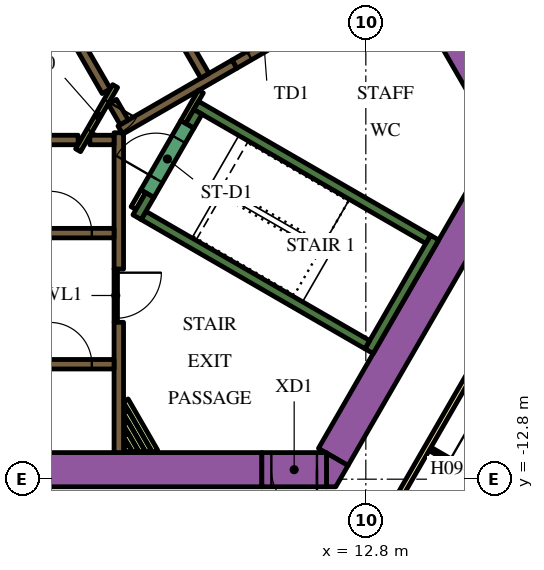
"""IFC4 building model, lengths in metres.
Left out: names, types, materials, properties, quantities, classifications, styles, units other than length and angle.
Written with IfcOpenShell. Run it as: python <this file> out.ifc"""

import sys

from ifc_helpers import new_model, si_unit, direction, frame, frame_2d, origin, place, context, subcontext, project, spatial, polyline, rectangle, outline, extrude, element, fill, save


model = new_model("IFC4")
c1 = context("Model", 3, precision=1e-05, world=origin(), true_north=direction((0.0, 1.0)))
c2 = subcontext(c1, "Body", "Model", "MODEL_VIEW")
j1 = project(units=[si_unit("LENGTHUNIT", "METRE"), si_unit("PLANEANGLEUNIT", "RADIAN")], contexts=[c1])
p1 = place(None, origin())
s1 = spatial("IfcSite", under=j1, at=p1, CompositionType="ELEMENT")
p2 = place(p1, origin())
s2 = spatial("IfcBuilding", under=s1, at=p2, CompositionType="ELEMENT")
p3 = place(p2, frame((0.0, 0.0, 118.8)))
s3 = spatial("IfcBuildingStorey", under=s2, at=p3, CompositionType="ELEMENT", Elevation=118.8)
p4 = place(p3, frame((6.776, 13.364, 0.0), z_axis=(0.0, 0.0, 1.0), x_axis=(0.500004177138, -0.8660229921, 0.0)))
e1 = element("IfcWall", 1, at=p4, inside=s3, PredefinedType="SOLIDWALL", context=c2, shape_type="SweptSolid", body=[
    extrude(rectangle(XDim=20.204, YDim=0.9, at=frame_2d((10.102, 0.0))), origin(), (0.0, 0.0, 1.0), 3.9),
])
p5 = place(p3, frame((11.943, -12.214, 0.0), z_axis=(0.0, 0.0, 1.0), x_axis=(0.49998092645, 0.866036415623, 0.0)))
e2 = element("IfcWall", 2, at=p5, inside=s3, PredefinedType="SOLIDWALL", context=c2, shape_type="SweptSolid", body=[
    extrude(rectangle(XDim=8.83, YDim=0.9, at=frame_2d((4.415, 0.0))), origin(), (0.0, 0.0, 1.0), 3.9),
])
p6 = place(p3, origin())
e3 = element("IfcWall", 3, at=p6, inside=s3, PredefinedType="SOLIDWALL", context=c2, shape_type="SweptSolid", body=[
    extrude(outline(polyline([(12.009, -13.0), (11.764, -13.0), (11.764, -12.113), (12.332, -12.441), (12.009, -13.0)])), origin(), (0.0, 0.0, 1.0), 3.9),
])
p7 = place(p3, frame((-12.019, -12.55, 0.0), z_axis=(0.0, 0.0, 1.0), x_axis=(1.0, 0.0, 0.0)))
e4 = element("IfcWall", 4, at=p7, inside=s3, PredefinedType="SOLIDWALL", context=c2, shape_type="SweptSolid", body=[
    extrude(rectangle(XDim=22.083, YDim=0.9, at=frame_2d((11.042, 0.0))), origin(), (0.0, 0.0, 1.0), 3.9),
])
p8 = place(p3, frame((12.885, -9.431, 0.0), z_axis=(0.0, 0.0, 1.0), x_axis=(0.500020560727, 0.866013532718, 0.0)))
e5 = element("IfcWall", 5, at=p8, inside=s3, PredefinedType="SOLIDWALL", context=c2, shape_type="SweptSolid", body=[
    extrude(rectangle(XDim=3.45, YDim=0.25, at=frame_2d((1.725, 0.0))), origin(), (0.0, 0.0, 1.0), 3.9),
])
p9 = place(p3, frame((12.84, -9.261, 0.0), z_axis=(0.0, 0.0, 1.0), x_axis=(-0.866013990052, 0.500019768644, 0.0)))
e6 = element("IfcWall", 6, at=p9, inside=s3, PredefinedType="SOLIDWALL", context=c2, shape_type="SweptSolid", body=[
    extrude(rectangle(XDim=6.8, YDim=0.25, at=frame_2d((3.4, 0.0))), origin(), (0.0, 0.0, 1.0), 3.9),
])
p10 = place(p3, frame((6.78, -5.906, 0.0), z_axis=(0.0, 0.0, 1.0), x_axis=(0.500223362819, 0.865896406789, 0.0)))
e7 = element("IfcWall", 7, at=p10, inside=s3, PredefinedType="SOLIDWALL", context=c2, shape_type="SweptSolid", body=[
    extrude(rectangle(XDim=0.675, YDim=0.25, at=frame_2d((0.337, 0.0))), origin(), (0.0, 0.0, 1.0), 3.9),
])
p11 = place(p3, frame((8.334, -2.964, 0.0), z_axis=(0.0, 0.0, 1.0), x_axis=(0.866016039709, -0.500016218704, 0.0)))
e8 = element("IfcWall", 8, at=p11, inside=s3, PredefinedType="SOLIDWALL", context=c2, shape_type="SweptSolid", body=[
    extrude(rectangle(XDim=7.05, YDim=0.25, at=frame_2d((3.525, 0.0))), origin(), (0.0, 0.0, 1.0), 3.9),
])
p12 = place(p3, frame((8.168, -3.503, 0.0), z_axis=(0.0, 0.0, 1.0), x_axis=(0.49972245349, 0.866185586049, 0.0)))
e9 = element("IfcWall", 9, at=p12, inside=s3, PredefinedType="SOLIDWALL", context=c2, shape_type="SweptSolid", body=[
    extrude(rectangle(XDim=0.425, YDim=0.25, at=frame_2d((0.212, 0.0))), origin(), (0.0, 0.0, 1.0), 3.9),
])
p13 = place(p3, frame((-5.259, -3.875, 0.0), z_axis=(0.0, 0.0, 1.0), x_axis=(1.0, 0.0, 0.0)))
e10 = element("IfcWall", 10, at=p13, inside=s3, PredefinedType="SOLIDWALL", context=c2, shape_type="SweptSolid", body=[
    extrude(rectangle(XDim=10.489, YDim=0.25, at=frame_2d((5.244, 0.0))), origin(), (0.0, 0.0, 1.0), 3.9),
])
p14 = place(p3, frame((6.3, -7.27, 0.0), z_axis=(0.0, 0.0, 1.0), x_axis=(0.0, 1.0, 0.0)))
e11 = element("IfcWall", 11, at=p14, inside=s3, PredefinedType="SOLIDWALL", context=c2, shape_type="SweptSolid", body=[
    extrude(rectangle(XDim=3.586, YDim=0.25, at=frame_2d((1.793, 0.0))), origin(), (0.0, 0.0, 1.0), 3.9),
])
p15 = place(p3, frame((6.3, -12.1, 0.0), z_axis=(0.0, 0.0, 1.0), x_axis=(0.0, 1.0, 0.0)))
e12 = element("IfcWall", 12, at=p15, inside=s3, PredefinedType="SOLIDWALL", context=c2, shape_type="SweptSolid", body=[
    extrude(rectangle(XDim=3.428, YDim=0.25, at=frame_2d((1.714, 0.0))), origin(), (0.0, 0.0, 1.0), 3.9),
])
p16 = place(p3, frame((5.538, -3.875, 0.0), z_axis=(0.0, 0.0, 1.0), x_axis=(1.0, 0.0, 0.0)))
e13 = element("IfcWall", 13, at=p16, inside=s3, PredefinedType="SOLIDWALL", context=c2, shape_type="SweptSolid", body=[
    extrude(rectangle(XDim=0.637, YDim=0.25, at=frame_2d((0.318, 0.0))), origin(), (0.0, 0.0, 1.0), 3.9),
])
p17 = place(p3, frame((9.346, -1.879, 0.0), z_axis=(0.0, 0.0, 1.0), x_axis=(-0.866048528039, -0.499959945477, 0.0)))
e14 = element("IfcWall", 14, at=p17, inside=s3, PredefinedType="SOLIDWALL", context=c2, shape_type="SweptSolid", body=[
    extrude(rectangle(XDim=3.47, YDim=0.25, at=frame_2d((1.735, 0.0))), origin(), (0.0, 0.0, 1.0), 3.9),
])
p18 = place(p3, frame((6.13, -2.867, 0.0), z_axis=(0.0, 0.0, 1.0), x_axis=(0.500160776593, -0.865932559475, 0.0)))
e15 = element("IfcWall", 15, at=p18, inside=s3, PredefinedType="SOLIDWALL", context=c2, shape_type="SweptSolid", body=[
    extrude(rectangle(XDim=0.627, YDim=0.25, at=frame_2d((0.313, 0.0))), origin(), (0.0, 0.0, 1.0), 3.9),
])
p19 = place(p3, frame((5.97, -2.591, 0.0), z_axis=(0.0, 0.0, 1.0), x_axis=(-0.499994469932, 0.866028596547, 0.0)))
e16 = element("IfcWall", 16, at=p19, inside=s3, PredefinedType="SOLIDWALL", context=c2, shape_type="SweptSolid", body=[
    extrude(rectangle(XDim=10.488, YDim=0.25, at=frame_2d((5.244, 0.0))), origin(), (0.0, 0.0, 1.0), 3.9),
])
p20 = place(p3, frame((6.48, -10.726, 0.0), z_axis=(0.0, 0.0, 1.0), x_axis=(0.500017819788, -0.86601511528, 0.0)))
e17 = element("IfcWall", 17, at=p20, inside=s3, PredefinedType="PARTITIONING", context=c2, shape_type="SweptSolid", body=[
    extrude(rectangle(XDim=1.55, YDim=0.15, at=frame_2d((0.775, 0.0))), origin(), (0.0, 0.0, 1.0), 2.75),
])
p21 = place(p3, frame((6.48, -11.026, 0.0), z_axis=(0.0, 0.0, 1.0), x_axis=(0.49995654735, -0.86605048973, 0.0)))
e18 = element("IfcWall", 18, at=p21, inside=s3, PredefinedType="PARTITIONING", context=c2, shape_type="SweptSolid", body=[
    extrude(rectangle(XDim=1.204, YDim=0.15, at=frame_2d((0.602, 0.0))), origin(), (0.0, 0.0, 1.0), 2.75),
])
p22 = place(p3, frame((6.48, -11.326, 0.0), z_axis=(0.0, 0.0, 1.0), x_axis=(0.500059337743, -0.865991142412, 0.0)))
e19 = element("IfcWall", 19, at=p22, inside=s3, PredefinedType="PARTITIONING", context=c2, shape_type="SweptSolid", body=[
    extrude(rectangle(XDim=0.857, YDim=0.15, at=frame_2d((0.429, 0.0))), origin(), (0.0, 0.0, 1.0), 2.75),
])
p23 = place(p3, frame((6.48, -11.626, 0.0), z_axis=(0.0, 0.0, 1.0), x_axis=(0.500301480982, -0.865851273677, 0.0)))
e20 = element("IfcWall", 20, at=p23, inside=s3, PredefinedType="PARTITIONING", context=c2, shape_type="SweptSolid", body=[
    extrude(rectangle(XDim=0.511, YDim=0.15, at=frame_2d((0.255, 0.0))), origin(), (0.0, 0.0, 1.0), 2.75),
])
p24 = place(p3, frame((6.48, -11.926, 0.0), z_axis=(0.0, 0.0, 1.0), x_axis=(0.500450775723, -0.86576499183, 0.0)))
e21 = element("IfcWall", 21, at=p24, inside=s3, PredefinedType="PARTITIONING", context=c2, shape_type="SweptSolid", body=[
    extrude(rectangle(XDim=0.164, YDim=0.15, at=frame_2d((0.082, 0.0))), origin(), (0.0, 0.0, 1.0), 2.75),
])
p25 = place(p3, frame((6.945, -5.222, 0.0), z_axis=(0.0, 0.0, 1.0), x_axis=(-0.499818422106, -0.866130212453, 0.0)))
e22 = element("IfcWall", 22, at=p25, inside=s3, PredefinedType="PARTITIONING", context=c2, shape_type="SweptSolid", body=[
    extrude(rectangle(XDim=0.514, YDim=0.15, at=frame_2d((0.257, 0.0))), origin(), (0.0, 0.0, 1.0), 2.75),
])
p26 = place(p3, frame((8.459, -2.599, 0.0), z_axis=(0.0, 0.0, 1.0), x_axis=(-0.500041054325, -0.866001699761, 0.0)))
e23 = element("IfcWall", 23, at=p26, inside=s3, PredefinedType="PARTITIONING", context=c2, shape_type="SweptSolid", body=[
    extrude(rectangle(XDim=0.929, YDim=0.15, at=frame_2d((0.464, 0.0))), origin(), (0.0, 0.0, 1.0), 3.9),
])
p27 = place(p3, frame((-6.175, -9.775, 0.0), z_axis=(0.0, 0.0, 1.0), x_axis=(1.0, 0.0, 0.0)))
e24 = element("IfcWall", 24, at=p27, inside=s3, PredefinedType="SOLIDWALL", context=c2, shape_type="SweptSolid", body=[
    extrude(rectangle(XDim=12.35, YDim=0.25, at=frame_2d((6.175, 0.0))), origin(), (0.0, 0.0, 1.0), 3.9),
])
p28 = place(p27, frame((0.585, 0.0, 0.0)))
e25 = element("IfcOpeningElement", 25, at=p28, cuts=e24, PredefinedType="OPENING", context=c2, shape_type="SweptSolid", body=[
    extrude(rectangle(XDim=1.1, YDim=2.1, at=frame_2d((0.55, 1.05))), frame((0.0, 0.135, 0.0), z_axis=(0.0, -1.0, 0.0), x_axis=(1.0, 0.0, 0.0)), (0.0, 0.0, 1.0), 0.27),
])
p29 = place(p27, frame((3.105, 0.0, 0.0)))
e26 = element("IfcOpeningElement", 26, at=p29, cuts=e24, PredefinedType="OPENING", context=c2, shape_type="SweptSolid", body=[
    extrude(rectangle(XDim=1.1, YDim=2.1, at=frame_2d((0.55, 1.05))), frame((0.0, 0.135, 0.0), z_axis=(0.0, -1.0, 0.0), x_axis=(1.0, 0.0, 0.0)), (0.0, 0.0, 1.0), 0.27),
])
p30 = place(p27, frame((5.625, 0.0, 0.0)))
e27 = element("IfcOpeningElement", 27, at=p30, cuts=e24, PredefinedType="OPENING", context=c2, shape_type="SweptSolid", body=[
    extrude(rectangle(XDim=1.1, YDim=2.1, at=frame_2d((0.55, 1.05))), frame((0.0, 0.135, 0.0), z_axis=(0.0, -1.0, 0.0), x_axis=(1.0, 0.0, 0.0)), (0.0, 0.0, 1.0), 0.27),
])
p31 = place(p27, frame((8.145, 0.0, 0.0)))
e28 = element("IfcOpeningElement", 28, at=p31, cuts=e24, PredefinedType="OPENING", context=c2, shape_type="SweptSolid", body=[
    extrude(rectangle(XDim=1.1, YDim=2.1, at=frame_2d((0.55, 1.05))), frame((0.0, 0.135, 0.0), z_axis=(0.0, -1.0, 0.0), x_axis=(1.0, 0.0, 0.0)), (0.0, 0.0, 1.0), 0.27),
])
p32 = place(p27, frame((10.665, 0.0, 0.0)))
e29 = element("IfcOpeningElement", 29, at=p32, cuts=e24, PredefinedType="OPENING", context=c2, shape_type="SweptSolid", body=[
    extrude(rectangle(XDim=1.1, YDim=2.1, at=frame_2d((0.55, 1.05))), frame((0.0, 0.135, 0.0), z_axis=(0.0, -1.0, 0.0), x_axis=(1.0, 0.0, 0.0)), (0.0, 0.0, 1.0), 0.27),
])
p33 = place(p3, frame((-6.175, -6.325, 0.0), z_axis=(0.0, 0.0, 1.0), x_axis=(1.0, 0.0, 0.0)))
e30 = element("IfcWall", 30, at=p33, inside=s3, PredefinedType="SOLIDWALL", context=c2, shape_type="SweptSolid", body=[
    extrude(rectangle(XDim=12.35, YDim=0.25, at=frame_2d((6.175, 0.0))), origin(), (0.0, 0.0, 1.0), 3.9),
])
p34 = place(p33, frame((3.205, 0.0, 0.0)))
e31 = element("IfcOpeningElement", 31, at=p34, cuts=e30, PredefinedType="OPENING", context=c2, shape_type="SweptSolid", body=[
    extrude(rectangle(XDim=0.9, YDim=2.1, at=frame_2d((0.45, 1.05))), frame((0.0, 0.135, 0.0), z_axis=(0.0, -1.0, 0.0), x_axis=(1.0, 0.0, 0.0)), (0.0, 0.0, 1.0), 0.27),
])
p35 = place(p33, frame((8.145, 0.0, 0.0)))
e32 = element("IfcOpeningElement", 32, at=p35, cuts=e30, PredefinedType="OPENING", context=c2, shape_type="SweptSolid", body=[
    extrude(rectangle(XDim=1.1, YDim=2.1, at=frame_2d((0.55, 1.05))), frame((0.0, 0.135, 0.0), z_axis=(0.0, -1.0, 0.0), x_axis=(1.0, 0.0, 0.0)), (0.0, 0.0, 1.0), 0.27),
])
p36 = place(p33, frame((10.665, 0.0, 0.0)))
e33 = element("IfcOpeningElement", 33, at=p36, cuts=e30, PredefinedType="OPENING", context=c2, shape_type="SweptSolid", body=[
    extrude(rectangle(XDim=1.1, YDim=2.1, at=frame_2d((0.55, 1.05))), frame((0.0, 0.135, 0.0), z_axis=(0.0, -1.0, 0.0), x_axis=(1.0, 0.0, 0.0)), (0.0, 0.0, 1.0), 0.27),
])
p37 = place(p3, frame((8.565, -2.185, 0.0), z_axis=(0.0, 0.0, 1.0), x_axis=(-0.499997954832, 0.866026584559, 0.0)))
e34 = element("IfcWall", 34, at=p37, inside=s3, PredefinedType="SOLIDWALL", context=c2, shape_type="SweptSolid", body=[
    extrude(rectangle(XDim=12.35, YDim=0.25, at=frame_2d((6.175, 0.0))), origin(), (0.0, 0.0, 1.0), 3.9),
])
p38 = place(p37, frame((5.725, 0.0, 0.0)))
e35 = element("IfcOpeningElement", 35, at=p38, cuts=e34, PredefinedType="OPENING", context=c2, shape_type="SweptSolid", body=[
    extrude(rectangle(XDim=0.9, YDim=2.1, at=frame_2d((0.45, 1.05))), frame((0.0, 0.135, 0.0), z_axis=(0.0, -1.0, 0.0), x_axis=(1.0, 0.0, 0.0)), (0.0, 0.0, 1.0), 0.27),
])
p39 = place(p3, frame((7.053, -5.284, 0.0), z_axis=(0.0, 0.0, 1.0), x_axis=(0.500078061341, 0.865980330357, 0.0)))
e36 = element("IfcWall", 36, at=p39, inside=s3, PredefinedType="SOLIDWALL", context=c2, shape_type="SweptSolid", body=[
    extrude(rectangle(XDim=2.1, YDim=0.4, at=frame_2d((1.05, 0.0))), origin(), (0.0, 0.0, 1.0), 3.9),
])
p40 = place(p39, frame((0.45, 0.0, 0.0)))
e37 = element("IfcOpeningElement", 37, at=p40, cuts=e36, PredefinedType="OPENING", context=c2, shape_type="SweptSolid", body=[
    extrude(rectangle(XDim=1.2, YDim=2.1, at=frame_2d((0.6, 1.05))), frame((0.0, 0.21, 0.0), z_axis=(0.0, -1.0, 0.0), x_axis=(1.0, 0.0, 0.0)), (0.0, 0.0, 1.0), 0.42),
])
p41 = place(p3, frame((9.346, -1.879, 0.0), z_axis=(0.0, 0.0, 1.0), x_axis=(0.866047807691, 0.499961193289, 0.0)))
e38 = element("IfcWall", 38, at=p41, inside=s3, PredefinedType="SOLIDWALL", context=c2, shape_type="SweptSolid", body=[
    extrude(rectangle(XDim=1.8, YDim=0.25, at=frame_2d((0.9, 0.0))), origin(), (0.0, 0.0, 1.0), 3.9),
])
p42 = place(p41, frame((0.45, 0.0, 0.0)))
e39 = element("IfcOpeningElement", 39, at=p42, cuts=e38, PredefinedType="OPENING", context=c2, shape_type="SweptSolid", body=[
    extrude(rectangle(XDim=0.9, YDim=2.1, at=frame_2d((0.45, 1.05))), frame((0.0, 0.135, 0.0), z_axis=(0.0, -1.0, 0.0), x_axis=(1.0, 0.0, 0.0)), (0.0, 0.0, 1.0), 0.27),
])
p43 = place(p3, frame((6.203, -2.456, 0.0), z_axis=(0.0, 0.0, 1.0), x_axis=(-0.500043961785, -0.866000020948, 0.0)))
e40 = element("IfcWall", 40, at=p43, inside=s3, PredefinedType="PARTITIONING", context=c2, shape_type="SweptSolid", body=[
    extrude(rectangle(XDim=1.95, YDim=0.15, at=frame_2d((0.975, 0.0))), origin(), (0.0, 0.0, 1.0), 3.9),
])
p44 = place(p43, frame((0.45, 0.0, 0.0)))
e41 = element("IfcOpeningElement", 41, at=p44, cuts=e40, PredefinedType="OPENING", context=c2, shape_type="SweptSolid", body=[
    extrude(rectangle(XDim=0.9, YDim=2.1, at=frame_2d((0.45, 1.05))), frame((0.0, 0.085, 0.0), z_axis=(0.0, -1.0, 0.0), x_axis=(1.0, 0.0, 0.0)), (0.0, 0.0, 1.0), 0.17),
])
p45 = place(p3, frame((6.22, -7.266, 0.0), z_axis=(0.0, 0.0, 1.0), x_axis=(0.0, -1.0, 0.0)))
e42 = element("IfcWall", 42, at=p45, inside=s3, PredefinedType="PARTITIONING", context=c2, shape_type="SweptSolid", body=[
    extrude(rectangle(XDim=1.4, YDim=0.09, at=frame_2d((0.7, 0.0))), origin(), (0.0, 0.0, 1.0), 2.75),
])
p46 = place(p45, frame((0.1, 0.0, 0.0)))
e43 = element("IfcOpeningElement", 43, at=p46, cuts=e42, PredefinedType="OPENING", context=c2, shape_type="SweptSolid", body=[
    extrude(rectangle(XDim=1.2, YDim=2.1, at=frame_2d((0.6, 1.05))), frame((0.0, 0.055, 0.0), z_axis=(0.0, -1.0, 0.0), x_axis=(1.0, 0.0, 0.0)), (0.0, 0.0, 1.0), 0.11),
])
p47 = place(p3, frame((11.764, -12.55, 0.0), z_axis=(0.0, 0.0, 1.0), x_axis=(-1.0, 0.0, 0.0)))
e44 = element("IfcWall", 44, at=p47, inside=s3, PredefinedType="SOLIDWALL", context=c2, shape_type="SweptSolid", body=[
    extrude(rectangle(XDim=1.7, YDim=0.9, at=frame_2d((0.85, 0.0))), origin(), (0.0, 0.0, 1.0), 3.9),
])
p48 = place(p47, frame((0.25, 0.0, 0.0)))
e45 = element("IfcOpeningElement", 45, at=p48, cuts=e44, PredefinedType="OPENING", context=c2, shape_type="SweptSolid", body=[
    extrude(rectangle(XDim=1.2, YDim=2.1, at=frame_2d((0.6, 1.05))), frame((0.0, 0.46, 0.0), z_axis=(0.0, -1.0, 0.0), x_axis=(1.0, 0.0, 0.0)), (0.0, 0.0, 1.0), 0.92),
])
p49 = place(p3, frame((6.163, 18.475, 0.0), z_axis=(0.0, 0.0, 1.0), x_axis=(0.500001317485, -0.866024643133, 0.0)))
e46 = element("IfcWall", 46, at=p49, inside=s3, PredefinedType="PARTITIONING", context=c2, shape_type="SweptSolid", body=[
    extrude(rectangle(XDim=25.767, YDim=0.15, at=frame_2d((12.883, 0.0))), origin(), (0.0, 0.0, 1.0), 2.75),
])
p50 = place(p49, frame((19.306, 0.0, 0.0)))
e47 = element("IfcOpeningElement", 47, at=p50, cuts=e46, PredefinedType="OPENING", context=c2, shape_type="SweptSolid", body=[
    extrude(rectangle(XDim=1.0, YDim=2.1, at=frame_2d((0.5, 1.05))), frame((0.0, 0.085, 0.0), z_axis=(0.0, -1.0, 0.0), x_axis=(1.0, 0.0, 0.0)), (0.0, 0.0, 1.0), 0.17),
])
p51 = place(p49, frame((17.999, 0.0, 0.0)))
e48 = element("IfcOpeningElement", 48, at=p51, cuts=e46, PredefinedType="OPENING", context=c2, shape_type="SweptSolid", body=[
    extrude(rectangle(XDim=1.0, YDim=2.1, at=frame_2d((0.5, 1.05))), frame((0.0, 0.085, 0.0), z_axis=(0.0, -1.0, 0.0), x_axis=(1.0, 0.0, 0.0)), (0.0, 0.0, 1.0), 0.17),
])
p52 = place(p49, frame((0.596, 0.0, 0.0)))
e49 = element("IfcOpeningElement", 49, at=p52, cuts=e46, PredefinedType="OPENING", context=c2, shape_type="SweptSolid", body=[
    extrude(rectangle(XDim=1.0, YDim=2.1, at=frame_2d((0.5, 1.05))), frame((0.0, 0.085, 0.0), z_axis=(0.0, -1.0, 0.0), x_axis=(1.0, 0.0, 0.0)), (0.0, 0.0, 1.0), 0.17),
])
p53 = place(p3, frame((15.587, -9.952, 0.0), z_axis=(0.0, 0.0, 1.0), x_axis=(-0.500016618951, -0.866015808616, 0.0)))
e50 = element("IfcWall", 50, at=p53, inside=s3, PredefinedType="PARTITIONING", context=c2, shape_type="SweptSolid", body=[
    extrude(rectangle(XDim=5.268, YDim=0.15, at=frame_2d((2.634, 0.0))), origin(), (0.0, 0.0, 1.0), 2.75),
])
p54 = place(p53, frame((4.088, 0.0, 0.0)))
e51 = element("IfcOpeningElement", 51, at=p54, cuts=e50, PredefinedType="OPENING", context=c2, shape_type="SweptSolid", body=[
    extrude(rectangle(XDim=1.0, YDim=2.1, at=frame_2d((0.5, 1.05))), frame((0.0, 0.085, 0.0), z_axis=(0.0, -1.0, 0.0), x_axis=(1.0, 0.0, 0.0)), (0.0, 0.0, 1.0), 0.17),
])
p55 = place(p3, frame((14.49, -12.003, 0.0), z_axis=(0.0, 0.0, 1.0), x_axis=(0.866059108428, -0.4999416173, 0.0)))
e52 = element("IfcWall", 52, at=p55, inside=s3, PredefinedType="PARTITIONING", context=c2, shape_type="SweptSolid", body=[
    extrude(rectangle(XDim=2.7, YDim=0.1, at=frame_2d((1.35, 0.0))), origin(), (0.0, 0.0, 1.0), 2.75),
])
p56 = place(p55, frame((0.6, 0.0, 0.0)))
e53 = element("IfcOpeningElement", 53, at=p56, cuts=e52, PredefinedType="OPENING", context=c2, shape_type="SweptSolid", body=[
    extrude(rectangle(XDim=0.9, YDim=2.1, at=frame_2d((0.45, 1.05))), frame((0.0, 0.06, 0.0), z_axis=(0.0, -1.0, 0.0), x_axis=(1.0, 0.0, 0.0)), (0.0, 0.0, 1.0), 0.12),
])
p57 = place(p32, origin())
e54 = element("IfcDoor", 54, at=p57, inside=s3, OperationType="DOUBLE_DOOR_SLIDING", PredefinedType="DOOR", context=c2, shape_type="SweptSolid", body=[
    extrude(rectangle(XDim=1.1, YDim=2.1, at=frame_2d((0.55, 1.05))), frame((0.0, 0.025, 0.0), z_axis=(0.0, -1.0, 0.0), x_axis=(1.0, 0.0, 0.0)), (0.0, 0.0, 1.0), 0.05),
])
fill(e29, e54)
p58 = place(p36, origin())
e55 = element("IfcDoor", 55, at=p58, inside=s3, OperationType="DOUBLE_DOOR_SLIDING", PredefinedType="DOOR", context=c2, shape_type="SweptSolid", body=[
    extrude(rectangle(XDim=1.1, YDim=2.1, at=frame_2d((0.55, 1.05))), frame((0.0, 0.025, 0.0), z_axis=(0.0, -1.0, 0.0), x_axis=(1.0, 0.0, 0.0)), (0.0, 0.0, 1.0), 0.05),
])
fill(e33, e55)
p59 = place(p40, origin())
e56 = element("IfcDoor", 56, at=p59, inside=s3, OperationType="SINGLE_SWING_LEFT", PredefinedType="DOOR", context=c2, shape_type="SweptSolid", body=[
    extrude(rectangle(XDim=1.2, YDim=2.1, at=frame_2d((0.6, 1.05))), frame((0.0, 0.025, 0.0), z_axis=(0.0, -1.0, 0.0), x_axis=(1.0, 0.0, 0.0)), (0.0, 0.0, 1.0), 0.05),
])
fill(e37, e56)
p60 = place(p42, origin())
e57 = element("IfcDoor", 57, at=p60, inside=s3, OperationType="SINGLE_SWING_LEFT", PredefinedType="DOOR", context=c2, shape_type="SweptSolid", body=[
    extrude(rectangle(XDim=0.9, YDim=2.1, at=frame_2d((0.45, 1.05))), frame((0.0, 0.025, 0.0), z_axis=(0.0, -1.0, 0.0), x_axis=(1.0, 0.0, 0.0)), (0.0, 0.0, 1.0), 0.05),
])
fill(e39, e57)
p61 = place(p44, origin())
e58 = element("IfcDoor", 58, at=p61, inside=s3, OperationType="SINGLE_SWING_LEFT", PredefinedType="DOOR", context=c2, shape_type="SweptSolid", body=[
    extrude(rectangle(XDim=0.9, YDim=2.1, at=frame_2d((0.45, 1.05))), frame((0.0, 0.025, 0.0), z_axis=(0.0, -1.0, 0.0), x_axis=(1.0, 0.0, 0.0)), (0.0, 0.0, 1.0), 0.05),
])
fill(e41, e58)
p62 = place(p46, origin())
e59 = element("IfcDoor", 59, at=p62, inside=s3, OperationType="SINGLE_SWING_LEFT", PredefinedType="DOOR", context=c2, shape_type="SweptSolid", body=[
    extrude(rectangle(XDim=1.2, YDim=2.1, at=frame_2d((0.6, 1.05))), frame((0.0, 0.025, 0.0), z_axis=(0.0, -1.0, 0.0), x_axis=(1.0, 0.0, 0.0)), (0.0, 0.0, 1.0), 0.05),
])
fill(e43, e59)
p63 = place(p48, origin())
e60 = element("IfcDoor", 60, at=p63, inside=s3, OperationType="SINGLE_SWING_LEFT", PredefinedType="DOOR", context=c2, shape_type="SweptSolid", body=[
    extrude(rectangle(XDim=1.2, YDim=2.1, at=frame_2d((0.6, 1.05))), frame((0.0, 0.025, 0.0), z_axis=(0.0, -1.0, 0.0), x_axis=(1.0, 0.0, 0.0)), (0.0, 0.0, 1.0), 0.05),
])
fill(e45, e60)
p64 = place(p56, origin())
e61 = element("IfcDoor", 61, at=p64, inside=s3, OperationType="SINGLE_SWING_LEFT", PredefinedType="DOOR", context=c2, shape_type="SweptSolid", body=[
    extrude(rectangle(XDim=0.9, YDim=2.1, at=frame_2d((0.45, 1.05))), frame((0.0, 0.025, 0.0), z_axis=(0.0, -1.0, 0.0), x_axis=(1.0, 0.0, 0.0)), (0.0, 0.0, 1.0), 0.05),
])
fill(e53, e61)
save(model, sys.argv[1])
